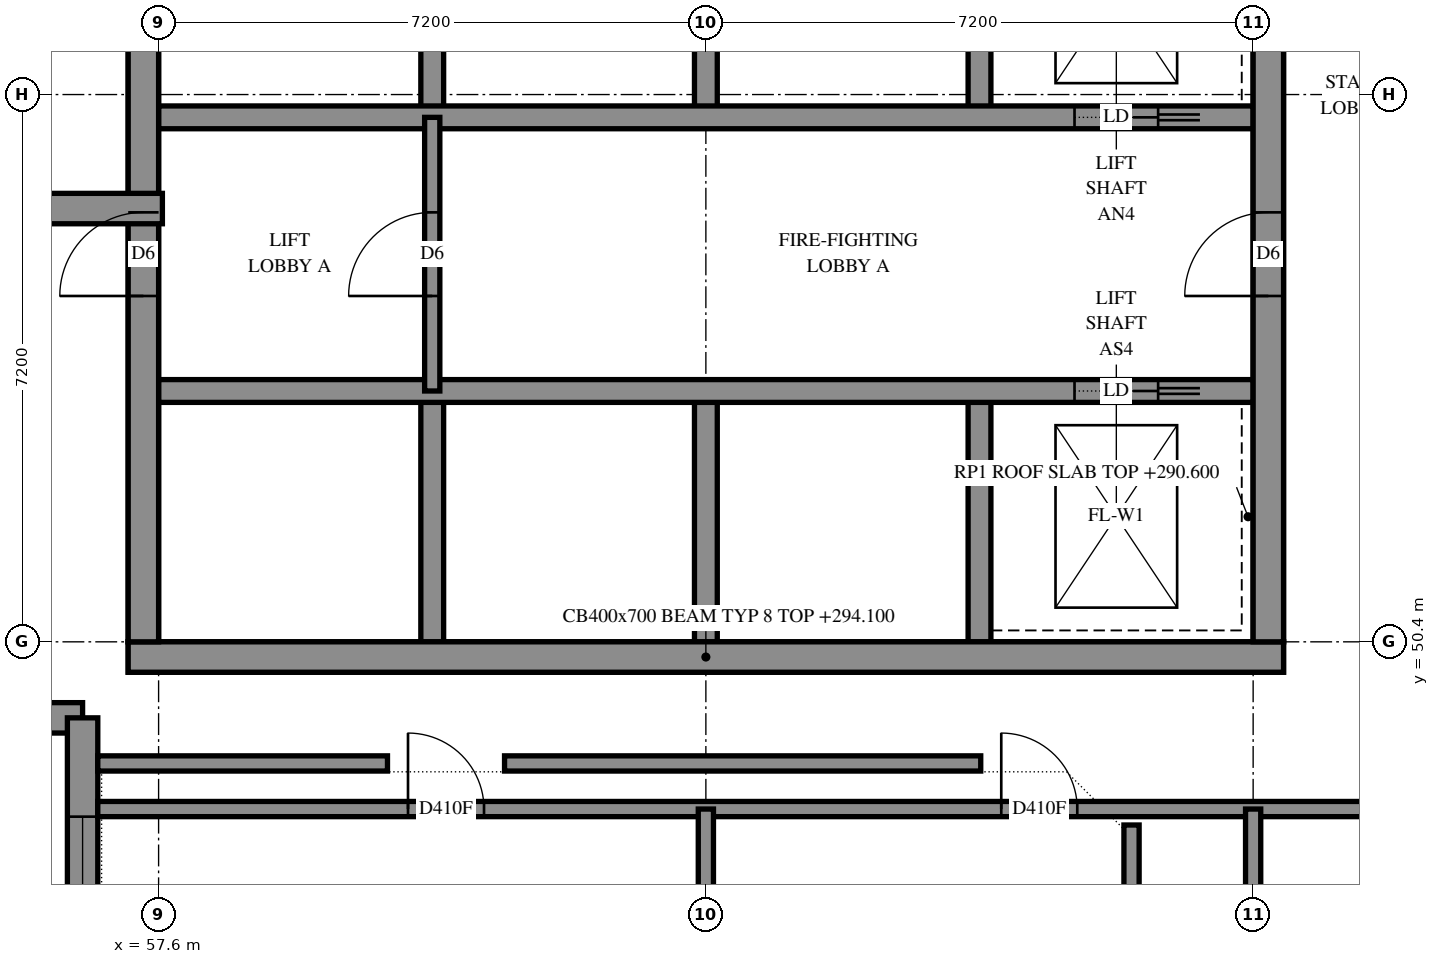
"""IFC4 building model, lengths in metres.
Left out: names, types, materials, properties, quantities, classifications, styles, units other than length and angle.
Written with IfcOpenShell. Run it as: python <this file> out.ifc"""

import sys

from ifc_helpers import new_model, si_unit, direction, frame, frame_2d, origin, place, context, subcontext, project, spatial, polyline, rectangle, outline, extrude, element, fill, save


model = new_model("IFC4")
c1 = context("Model", 3, precision=1e-05, world=origin(), true_north=direction((0.0, 1.0)))
c2 = subcontext(c1, "Body", "Model", "MODEL_VIEW")
j1 = project(units=[si_unit("LENGTHUNIT", "METRE"), si_unit("PLANEANGLEUNIT", "RADIAN")], contexts=[c1])
p1 = place(None, origin())
s1 = spatial("IfcSite", under=j1, at=p1, CompositionType="ELEMENT")
p2 = place(p1, origin())
s2 = spatial("IfcBuilding", under=s1, at=p2, CompositionType="ELEMENT")
p3 = place(p2, frame((0.0, 0.0, 290.6)))
s3 = spatial("IfcBuildingStorey", under=s2, at=p3, CompositionType="ELEMENT", Elevation=290.6)
p4 = place(p3, frame((57.2, 50.2, -0.3), z_axis=(0.0, 0.0, 1.0), x_axis=(1.0, 0.0, 0.0)))
e1 = element("IfcWall", 1, at=p4, inside=s3, PredefinedType="SHEAR", context=c2, shape_type="SweptSolid", body=[
    extrude(rectangle(XDim=15.2, YDim=0.4, at=frame_2d((7.6, 0.0))), origin(), (0.0, 0.0, 1.0), 3.1),
])
p5 = place(p3, frame((57.4, 50.4, -0.3), z_axis=(0.0, 0.0, 1.0), x_axis=(0.0, 1.0, 0.0)))
e2 = element("IfcWall", 2, at=p5, inside=s3, PredefinedType="SHEAR", context=c2, shape_type="SweptSolid", body=[
    extrude(rectangle(XDim=14.4, YDim=0.4, at=frame_2d((7.2, 0.0))), origin(), (0.0, 0.0, 1.0), 3.1),
])
p6 = place(p5, frame((4.55, 0.0, 0.3)))
e3 = element("IfcOpeningElement", 3, at=p6, cuts=e2, PredefinedType="OPENING", context=c2, shape_type="SweptSolid", body=[
    extrude(rectangle(XDim=1.1, YDim=2.1, at=frame_2d((0.55, 1.05))), frame((0.0, 0.21, 0.0), z_axis=(0.0, -1.0, 0.0), x_axis=(1.0, 0.0, 0.0)), (0.0, 0.0, 1.0), 0.42),
])
p7 = place(p5, frame((11.35, 0.0, 0.3)))
e4 = element("IfcOpeningElement", 4, at=p7, cuts=e2, PredefinedType="OPENING", context=c2, shape_type="SweptSolid", body=[
    extrude(rectangle(XDim=1.1, YDim=2.1, at=frame_2d((0.55, 1.05))), frame((0.0, 0.21, 0.0), z_axis=(0.0, -1.0, 0.0), x_axis=(1.0, 0.0, 0.0)), (0.0, 0.0, 1.0), 0.42),
])
p8 = place(p3, frame((72.2, 50.4, -0.3), z_axis=(0.0, 0.0, 1.0), x_axis=(0.0, 1.0, 0.0)))
e5 = element("IfcWall", 5, at=p8, inside=s3, PredefinedType="SHEAR", context=c2, shape_type="SweptSolid", body=[
    extrude(rectangle(XDim=14.4, YDim=0.4, at=frame_2d((7.2, 0.0))), origin(), (0.0, 0.0, 1.0), 3.1),
])
p9 = place(p8, frame((4.55, 0.0, 0.3)))
e6 = element("IfcOpeningElement", 6, at=p9, cuts=e5, PredefinedType="OPENING", context=c2, shape_type="SweptSolid", body=[
    extrude(rectangle(XDim=1.1, YDim=2.1, at=frame_2d((0.55, 1.05))), frame((0.0, 0.21, 0.0), z_axis=(0.0, -1.0, 0.0), x_axis=(1.0, 0.0, 0.0)), (0.0, 0.0, 1.0), 0.42),
])
p10 = place(p8, frame((11.35, 0.0, 0.3)))
e7 = element("IfcOpeningElement", 7, at=p10, cuts=e5, PredefinedType="OPENING", context=c2, shape_type="SweptSolid", body=[
    extrude(rectangle(XDim=1.1, YDim=2.1, at=frame_2d((0.55, 1.05))), frame((0.0, 0.21, 0.0), z_axis=(0.0, -1.0, 0.0), x_axis=(1.0, 0.0, 0.0)), (0.0, 0.0, 1.0), 0.42),
])
for number, where, z_axis, x_axis in (
    (8, (61.2, 50.4, 0.0), (0.0, 0.0, 1.0), (0.0, 1.0, 0.0)),
    (9, (61.2, 57.3, 0.0), (0.0, 0.0, 1.0), (0.0, 1.0, 0.0)),
    (10, (64.8, 50.4, 0.0), (0.0, 0.0, 1.0), (0.0, 1.0, 0.0)),
    (11, (64.8, 57.3, 0.0), (0.0, 0.0, 1.0), (0.0, 1.0, 0.0)),
    (12, (68.4, 50.4, 0.0), (0.0, 0.0, 1.0), (0.0, 1.0, 0.0)),
    (13, (68.4, 57.3, 0.0), (0.0, 0.0, 1.0), (0.0, 1.0, 0.0)),
):
    element("IfcWall", number, at=place(p3, frame(where, z_axis=z_axis, x_axis=x_axis)), inside=s3, PredefinedType="SOLIDWALL", context=c2, shape_type="SweptSolid", body=[
        extrude(rectangle(XDim=3.3, YDim=0.3, at=frame_2d((1.65, 0.0))), origin(), (0.0, 0.0, 1.0), 3.5),
    ])
p11 = place(p3, frame((57.6, 53.7, 0.0), z_axis=(0.0, 0.0, 1.0), x_axis=(1.0, 0.0, 0.0)))
e14 = element("IfcWall", 14, at=p11, inside=s3, PredefinedType="SOLIDWALL", context=c2, shape_type="SweptSolid", body=[
    extrude(rectangle(XDim=14.4, YDim=0.3, at=frame_2d((7.2, 0.0))), origin(), (0.0, 0.0, 1.0), 3.5),
])
p12 = place(p11, frame((12.05, 0.0, 0.0)))
e15 = element("IfcOpeningElement", 15, at=p12, cuts=e14, PredefinedType="OPENING", context=c2, shape_type="SweptSolid", body=[
    extrude(rectangle(XDim=1.1, YDim=2.1, at=frame_2d((0.55, 1.05))), frame((0.0, 0.16, 0.0), z_axis=(0.0, -1.0, 0.0), x_axis=(1.0, 0.0, 0.0)), (0.0, 0.0, 1.0), 0.32),
])
p13 = place(p3, frame((57.6, 57.3, 0.0), z_axis=(0.0, 0.0, 1.0), x_axis=(1.0, 0.0, 0.0)))
e16 = element("IfcWall", 16, at=p13, inside=s3, PredefinedType="SOLIDWALL", context=c2, shape_type="SweptSolid", body=[
    extrude(rectangle(XDim=14.4, YDim=0.3, at=frame_2d((7.2, 0.0))), origin(), (0.0, 0.0, 1.0), 3.5),
])
p14 = place(p13, frame((12.05, 0.0, 0.0)))
e17 = element("IfcOpeningElement", 17, at=p14, cuts=e16, PredefinedType="OPENING", context=c2, shape_type="SweptSolid", body=[
    extrude(rectangle(XDim=1.1, YDim=2.1, at=frame_2d((0.55, 1.05))), frame((0.0, 0.16, 0.0), z_axis=(0.0, -1.0, 0.0), x_axis=(1.0, 0.0, 0.0)), (0.0, 0.0, 1.0), 0.32),
])
p15 = place(p3, frame((49.4, 49.4, 0.0), z_axis=(0.0, 0.0, 1.0), x_axis=(1.0, 0.0, 0.0)))
e18 = element("IfcWall", 18, at=p15, inside=s3, PredefinedType="SOLIDWALL", context=c2, shape_type="SweptSolid", body=[
    extrude(outline(polyline([(-0.2, -0.2), (7.0, -0.2), (7.4, 0.2), (0.2, 0.2), (-0.2, -0.2)])), origin(), (0.0, 0.0, 1.0), 3.5),
])
p16 = place(p15, frame((1.9, 0.0, 0.7)))
e19 = element("IfcOpeningElement", 19, at=p16, cuts=e18, PredefinedType="OPENING", context=c2, shape_type="SweptSolid", body=[
    extrude(rectangle(XDim=1.8, YDim=2.2, at=frame_2d((0.9, 1.1))), frame((0.0, 0.21, 0.0), z_axis=(0.0, -1.0, 0.0), x_axis=(1.0, 0.0, 0.0)), (0.0, 0.0, 1.0), 0.42),
])
p17 = place(p15, frame((4.1, 0.0, 0.7)))
e20 = element("IfcOpeningElement", 20, at=p17, cuts=e18, PredefinedType="OPENING", context=c2, shape_type="SweptSolid", body=[
    extrude(rectangle(XDim=1.8, YDim=2.2, at=frame_2d((0.9, 1.1))), frame((0.0, 0.21, 0.0), z_axis=(0.0, -1.0, 0.0), x_axis=(1.0, 0.0, 0.0)), (0.0, 0.0, 1.0), 0.42),
])
p18 = place(p3, frame((56.6, 49.4, 0.0), z_axis=(0.0, 0.0, 1.0), x_axis=(0.0, -1.0, 0.0)))
e21 = element("IfcWall", 21, at=p18, inside=s3, PredefinedType="SOLIDWALL", context=c2, shape_type="SweptSolid", body=[
    extrude(outline(polyline([(0.2, -0.2), (8.633, -0.2), (8.075, 0.2), (-0.2, 0.2), (0.2, -0.2)])), origin(), (0.0, 0.0, 1.0), 3.5),
])
p19 = place(p18, frame((1.3, 0.0, 0.7)))
e22 = element("IfcOpeningElement", 22, at=p19, cuts=e21, PredefinedType="OPENING", context=c2, shape_type="SweptSolid", body=[
    extrude(rectangle(XDim=1.8, YDim=2.2, at=frame_2d((0.9, 1.1))), frame((0.0, 0.21, 0.0), z_axis=(0.0, -1.0, 0.0), x_axis=(1.0, 0.0, 0.0)), (0.0, 0.0, 1.0), 0.42),
])
p20 = place(p18, frame((3.9, 0.0, 0.7)))
e23 = element("IfcOpeningElement", 23, at=p20, cuts=e21, PredefinedType="OPENING", context=c2, shape_type="SweptSolid", body=[
    extrude(rectangle(XDim=1.8, YDim=2.2, at=frame_2d((0.9, 1.1))), frame((0.0, 0.21, 0.0), z_axis=(0.0, -1.0, 0.0), x_axis=(1.0, 0.0, 0.0)), (0.0, 0.0, 1.0), 0.42),
])
p21 = place(p3, frame((70.4, 42.4, 0.0), z_axis=(0.0, 0.0, 1.0), x_axis=(0.0, 1.0, 0.0)))
e24 = element("IfcWall", 24, at=p21, inside=s3, PredefinedType="PARAPET", context=c2, shape_type="SweptSolid", body=[
    extrude(outline(polyline([(0.0, -0.1), (5.632, -0.1), (5.549, 0.1), (0.0, 0.1), (0.0, -0.1)])), origin(), (0.0, 0.0, 1.0), 0.25),
])
p22 = place(p3, frame((61.2, 53.7, 0.0), z_axis=(0.0, 0.0, 1.0), x_axis=(0.0, 1.0, 0.0)))
e25 = element("IfcWall", 25, at=p22, inside=s3, PredefinedType="PARTITIONING", context=c2, shape_type="SweptSolid", body=[
    extrude(rectangle(XDim=3.6, YDim=0.2, at=frame_2d((1.8, 0.0))), origin(), (0.0, 0.0, 1.0), 3.5),
])
p23 = place(p22, frame((1.25, 0.0, 0.0)))
e26 = element("IfcOpeningElement", 26, at=p23, cuts=e25, PredefinedType="OPENING", context=c2, shape_type="SweptSolid", body=[
    extrude(rectangle(XDim=1.1, YDim=2.1, at=frame_2d((0.55, 1.05))), frame((0.0, 0.11, 0.0), z_axis=(0.0, -1.0, 0.0), x_axis=(1.0, 0.0, 0.0)), (0.0, 0.0, 1.0), 0.22),
])
p24 = place(p3, frame((56.8, 48.2, 0.0), z_axis=(0.0, 0.0, 1.0), x_axis=(1.0, 0.0, 0.0)))
e27 = element("IfcWall", 27, at=p24, inside=s3, PredefinedType="PARTITIONING", context=c2, shape_type="SweptSolid", body=[
    extrude(rectangle(XDim=17.632, YDim=0.2, at=frame_2d((8.816, 0.0))), origin(), (0.0, 0.0, 1.0), 3.5),
])
p25 = place(p24, frame((4.081, 0.0, 0.0)))
e28 = element("IfcOpeningElement", 28, at=p25, cuts=e27, PredefinedType="OPENING", context=c2, shape_type="SweptSolid", body=[
    extrude(rectangle(XDim=1.0, YDim=2.1, at=frame_2d((0.5, 1.05))), frame((0.0, 0.11, 0.0), z_axis=(0.0, -1.0, 0.0), x_axis=(1.0, 0.0, 0.0)), (0.0, 0.0, 1.0), 0.22),
])
p26 = place(p24, frame((11.886, 0.0, 0.0)))
e29 = element("IfcOpeningElement", 29, at=p26, cuts=e27, PredefinedType="OPENING", context=c2, shape_type="SweptSolid", body=[
    extrude(rectangle(XDim=1.0, YDim=2.1, at=frame_2d((0.5, 1.05))), frame((0.0, 0.11, 0.0), z_axis=(0.0, -1.0, 0.0), x_axis=(1.0, 0.0, 0.0)), (0.0, 0.0, 1.0), 0.22),
])
p27 = place(p3, frame((64.8, 42.85, 0.0), z_axis=(0.0, 0.0, 1.0), x_axis=(0.0, 1.0, 0.0)))
e30 = element("IfcWall", 30, at=p27, inside=s3, PredefinedType="PARTITIONING", context=c2, shape_type="SweptSolid", body=[
    extrude(rectangle(XDim=5.35, YDim=0.2, at=frame_2d((2.675, 0.0))), origin(), (0.0, 0.0, 1.0), 3.5),
])
p28 = place(p3, frame((72.0, 42.85, 0.0), z_axis=(0.0, 0.0, 1.0), x_axis=(0.0, 1.0, 0.0)))
e31 = element("IfcWall", 31, at=p28, inside=s3, PredefinedType="PARTITIONING", context=c2, shape_type="SweptSolid", body=[
    extrude(rectangle(XDim=5.35, YDim=0.2, at=frame_2d((2.675, 0.0))), origin(), (0.0, 0.0, 1.0), 3.0),
])
p29 = place(p3, frame((68.416, 48.8, 0.0), z_axis=(0.0, 0.0, 1.0), x_axis=(-1.0, 0.0, 0.0)))
e32 = element("IfcWall", 32, at=p29, inside=s3, PredefinedType="PARAPET", context=c2, shape_type="SweptSolid", body=[
    extrude(outline(polyline([(0.0, -0.1), (6.265, -0.1), (6.265, 0.1), (0.0, 0.1), (0.0, -0.1)])), origin(), (0.0, 0.0, 1.0), 0.25),
])
p30 = place(p3, frame((60.611, 48.8, 0.0), z_axis=(0.0, 0.0, 1.0), x_axis=(-1.0, 0.0, 0.0)))
e33 = element("IfcWall", 33, at=p30, inside=s3, PredefinedType="PARAPET", context=c2, shape_type="SweptSolid", body=[
    extrude(outline(polyline([(0.0, -0.1), (3.811, -0.1), (3.811, 0.1), (0.0, 0.1), (0.0, -0.1)])), origin(), (0.0, 0.0, 1.0), 0.25),
])
p31 = place(p19, origin())
e34 = element("IfcWindow", 34, at=p31, inside=s3, PartitioningType="SINGLE_PANEL", PredefinedType="WINDOW", context=c2, shape_type="SweptSolid", body=[
    extrude(rectangle(XDim=1.8, YDim=2.2, at=frame_2d((0.9, 1.1))), frame((0.0, 0.08, 0.0), z_axis=(0.0, -1.0, 0.0), x_axis=(1.0, 0.0, 0.0)), (0.0, 0.0, 1.0), 0.06),
])
fill(e22, e34)
p32 = place(p6, origin())
e35 = element("IfcDoor", 35, at=p32, inside=s3, OperationType="DOUBLE_DOOR_SINGLE_SWING", PredefinedType="DOOR", context=c2, shape_type="SweptSolid", body=[
    extrude(rectangle(XDim=1.1, YDim=2.1, at=frame_2d((0.55, 1.05))), frame((0.0, 0.025, 0.0), z_axis=(0.0, -1.0, 0.0), x_axis=(1.0, 0.0, 0.0)), (0.0, 0.0, 1.0), 0.05),
])
fill(e3, e35)
p33 = place(p9, origin())
e36 = element("IfcDoor", 36, at=p33, inside=s3, OperationType="DOUBLE_DOOR_SINGLE_SWING", PredefinedType="DOOR", context=c2, shape_type="SweptSolid", body=[
    extrude(rectangle(XDim=1.1, YDim=2.1, at=frame_2d((0.55, 1.05))), frame((0.0, 0.025, 0.0), z_axis=(0.0, -1.0, 0.0), x_axis=(1.0, 0.0, 0.0)), (0.0, 0.0, 1.0), 0.05),
])
fill(e6, e36)
p34 = place(p23, origin())
e37 = element("IfcDoor", 37, at=p34, inside=s3, OperationType="DOUBLE_DOOR_SINGLE_SWING", PredefinedType="DOOR", context=c2, shape_type="SweptSolid", body=[
    extrude(rectangle(XDim=1.1, YDim=2.1, at=frame_2d((0.55, 1.05))), frame((0.0, 0.025, 0.0), z_axis=(0.0, -1.0, 0.0), x_axis=(1.0, 0.0, 0.0)), (0.0, 0.0, 1.0), 0.05),
])
fill(e26, e37)
p35 = place(p12, origin())
e38 = element("IfcDoor", 38, at=p35, inside=s3, OperationType="SLIDING_TO_RIGHT", PredefinedType="DOOR", context=c2, shape_type="SweptSolid", body=[
    extrude(rectangle(XDim=1.1, YDim=2.1, at=frame_2d((0.55, 1.05))), frame((0.0, 0.025, 0.0), z_axis=(0.0, -1.0, 0.0), x_axis=(1.0, 0.0, 0.0)), (0.0, 0.0, 1.0), 0.05),
])
fill(e15, e38)
p36 = place(p14, origin())
e39 = element("IfcDoor", 39, at=p36, inside=s3, OperationType="SLIDING_TO_RIGHT", PredefinedType="DOOR", context=c2, shape_type="SweptSolid", body=[
    extrude(rectangle(XDim=1.1, YDim=2.1, at=frame_2d((0.55, 1.05))), frame((0.0, 0.025, 0.0), z_axis=(0.0, -1.0, 0.0), x_axis=(1.0, 0.0, 0.0)), (0.0, 0.0, 1.0), 0.05),
])
fill(e17, e39)
p37 = place(p25, origin())
e40 = element("IfcDoor", 40, at=p37, inside=s3, OperationType="SINGLE_SWING_LEFT", PredefinedType="DOOR", context=c2, shape_type="SweptSolid", body=[
    extrude(rectangle(XDim=1.0, YDim=2.1, at=frame_2d((0.5, 1.05))), frame((0.0, 0.025, 0.0), z_axis=(0.0, -1.0, 0.0), x_axis=(1.0, 0.0, 0.0)), (0.0, 0.0, 1.0), 0.05),
])
fill(e28, e40)
p38 = place(p26, origin())
e41 = element("IfcDoor", 41, at=p38, inside=s3, OperationType="SINGLE_SWING_LEFT", PredefinedType="DOOR", context=c2, shape_type="SweptSolid", body=[
    extrude(rectangle(XDim=1.0, YDim=2.1, at=frame_2d((0.5, 1.05))), frame((0.0, 0.025, 0.0), z_axis=(0.0, -1.0, 0.0), x_axis=(1.0, 0.0, 0.0)), (0.0, 0.0, 1.0), 0.05),
])
fill(e29, e41)
save(model, sys.argv[1])
